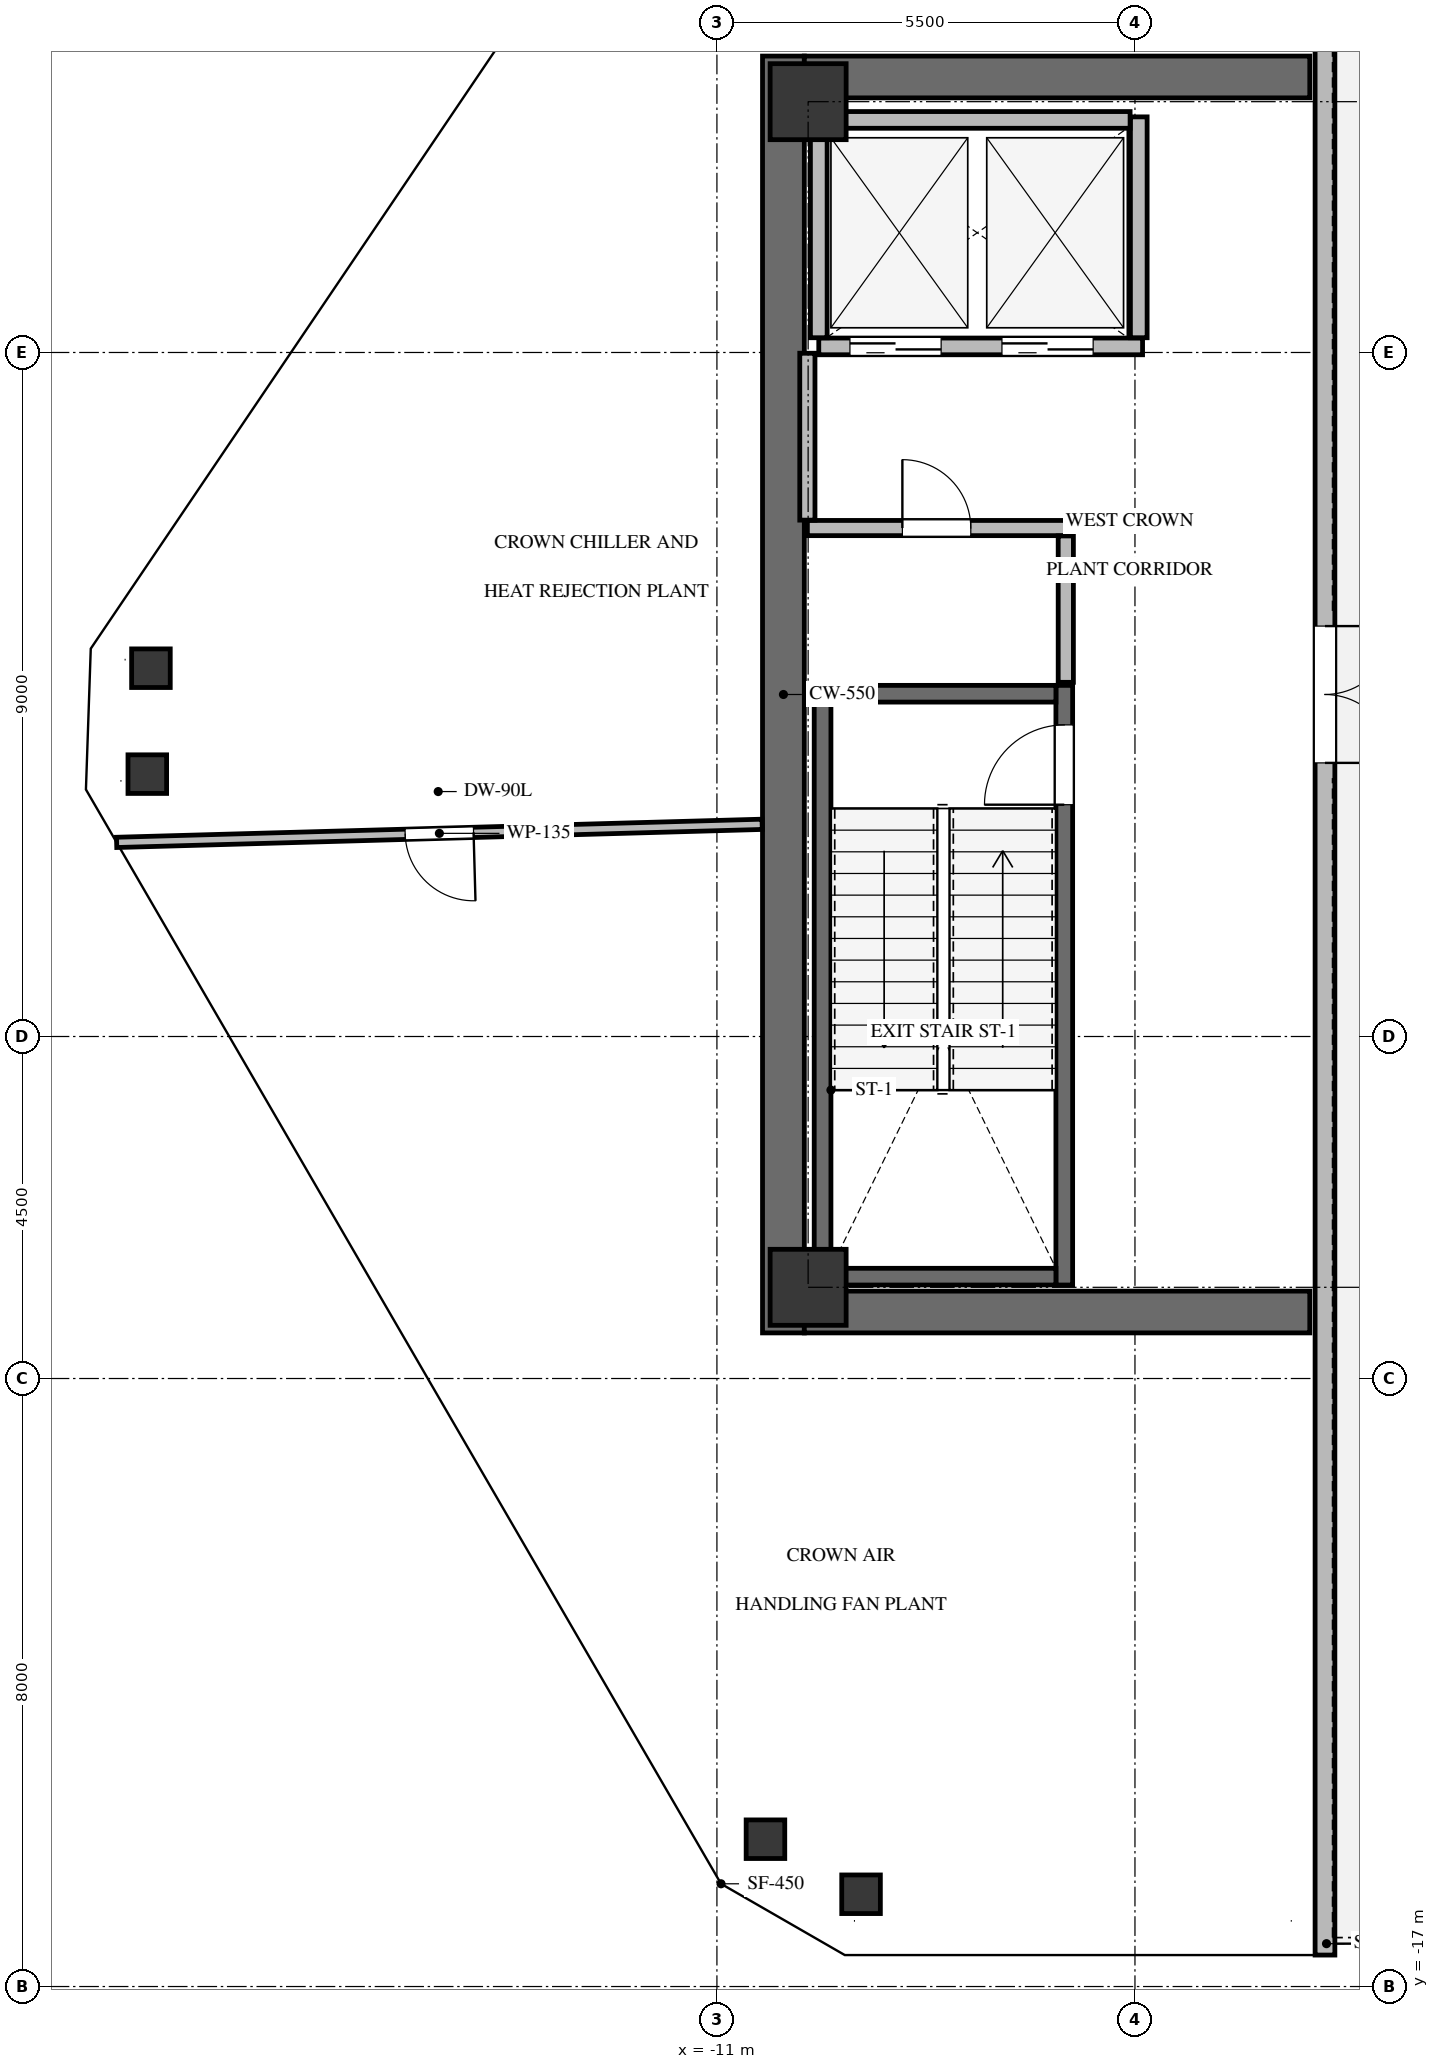
"""IFC4 building model, lengths in metres.
Left out: names, types, materials, properties, quantities, classifications, styles, units other than length and angle.
Written with IfcOpenShell. Run it as: python <this file> out.ifc"""

import sys

from ifc_helpers import new_model, si_unit, direction, frame, frame_2d, origin, origin_2d, place, context, subcontext, project, spatial, rectangle, hollow_circle, extrude, source, transform, mapped, element, fill, save


model = new_model("IFC4")
c1 = context("Model", 3, precision=1e-05, world=origin(), true_north=direction((0.0, 1.0)))
c2 = subcontext(c1, "Body", "Model", "MODEL_VIEW")
j1 = project(units=[si_unit("LENGTHUNIT", "METRE"), si_unit("PLANEANGLEUNIT", "RADIAN")], contexts=[c1])
p1 = place(None, origin())
s1 = spatial("IfcSite", under=j1, at=p1, CompositionType="ELEMENT")
p2 = place(p1, origin())
s2 = spatial("IfcBuilding", under=s1, at=p2, CompositionType="ELEMENT")
p3 = place(p2, frame((0.0, 0.0, 272.5)))
s3 = spatial("IfcBuildingStorey", under=s2, at=p3, CompositionType="ELEMENT", Elevation=272.5)
p4 = place(p3, frame((-10.125, -8.4, 0.0), z_axis=(0.0, 0.0, 1.0), x_axis=(0.0, 1.0, 0.0)))
e1 = element("IfcWall", 1, at=p4, inside=s3, PredefinedType="SHEAR", context=c2, shape_type="SweptSolid", body=[
    extrude(rectangle(XDim=16.8, YDim=0.55, at=frame_2d((8.4, 0.0))), origin(), (0.0, 0.0, 1.0), 4.8),
])
for number, where, z_axis, x_axis in (
    (2, (-9.85, -8.125, 0.0), (0.0, 0.0, 1.0), (1.0, 0.0, 0.0)),
    (3, (-9.85, 8.125, 0.0), (0.0, 0.0, 1.0), (1.0, 0.0, 0.0)),
):
    element("IfcWall", number, at=place(p3, frame(where, z_axis=z_axis, x_axis=x_axis)), inside=s3, PredefinedType="SHEAR", context=c2, shape_type="SweptSolid", body=[
        extrude(rectangle(XDim=6.65, YDim=0.55, at=frame_2d((3.325, 0.0))), origin(), (0.0, 0.0, 1.0), 4.8),
    ])
p5 = place(p3, frame((-6.43, -7.77, -0.45), z_axis=(0.0, 0.0, 1.0), x_axis=(0.0, 1.0, 0.0)))
e4 = element("IfcWall", 4, at=p5, inside=s3, PredefinedType="SHEAR", context=c2, shape_type="SweptSolid", body=[
    extrude(rectangle(XDim=7.89, YDim=0.22, at=frame_2d((3.945, 0.0))), origin(), (0.0, 0.0, 1.0), 4.97),
])
p6 = place(p5, frame((6.32, 0.0, 0.0)))
e5 = element("IfcOpeningElement", 5, at=p6, cuts=e4, PredefinedType="OPENING", context=c2, shape_type="SweptSolid", body=[
    extrude(rectangle(XDim=1.05, YDim=2.15, at=frame_2d((0.525, 1.075))), frame((0.0, 0.12, 0.0), z_axis=(0.0, -1.0, 0.0), x_axis=(1.0, 0.0, 0.0)), (0.0, 0.0, 1.0), 0.24),
])
p7 = place(p3, frame((-9.61, 0.12, -0.45), z_axis=(0.0, 0.0, 1.0), x_axis=(0.0, -1.0, 0.0)))
e6 = element("IfcWall", 6, at=p7, inside=s3, PredefinedType="SHEAR", context=c2, shape_type="SweptSolid", body=[
    extrude(rectangle(XDim=7.89, YDim=0.22, at=frame_2d((3.945, 0.0))), origin(), (0.0, 0.0, 1.0), 4.97),
])
for number, where, z_axis, x_axis in (
    (7, (-9.5, -7.66, -0.45), (0.0, 0.0, 1.0), (1.0, 0.0, 0.0)),
    (8, (-6.54, 0.01, -0.45), (0.0, 0.0, 1.0), (-1.0, 0.0, 0.0)),
):
    element("IfcWall", number, at=place(p3, frame(where, z_axis=z_axis, x_axis=x_axis)), inside=s3, PredefinedType="SHEAR", context=c2, shape_type="SweptSolid", body=[
        extrude(rectangle(XDim=2.96, YDim=0.22, at=frame_2d((1.48, 0.0))), origin(), (0.0, 0.0, 1.0), 4.97),
    ])
m1 = source(origin(), c2, "Body", "SweptSolid", [
    extrude(rectangle(XDim=1.0, YDim=1.0, at=origin_2d()), origin(), (0.0, 0.0, 1.0), 4.97),
])
for number, where, z_axis, x_axis in (
    (9, (-9.8, -7.8, -0.45), (0.0, 0.0, 1.0), (1.0, 0.0, 0.0)),
    (10, (-9.8, 7.8, -0.45), (0.0, 0.0, 1.0), (1.0, 0.0, 0.0)),
):
    element("IfcColumn", number, at=place(p3, frame(where, z_axis=z_axis, x_axis=x_axis)), inside=s3, PredefinedType="COLUMN", context=c2, shape_type="MappedRepresentation", body=[
        mapped(m1, transform((0.0, 0.0, 0.0), x_axis=(1.0, 0.0, 0.0), y_axis=(0.0, 1.0, 0.0), z_axis=(0.0, 0.0, 1.0), scale=1.0)),
    ])
m2 = source(origin(), c2, "Body", "SweptSolid", [
    extrude(hollow_circle(Radius=0.254, WallThickness=0.012, at=origin_2d()), origin(), (0.0, 0.0, 1.0), 4.97),
])
for number, where, z_axis, x_axis in (
    (11, (-10.361, -15.062, -0.45), (0.0, 0.0, 1.0), (1.0, 0.0, 0.0)),
    (12, (-18.494, -1.048, -0.45), (0.0, 0.0, 1.0), (1.0, 0.0, 0.0)),
    (13, (-18.446, 0.346, -0.45), (0.0, 0.0, 1.0), (1.0, 0.0, 0.0)),
    (14, (-9.104, -15.786, -0.45), (0.0, 0.0, 1.0), (1.0, 0.0, 0.0)),
):
    element("IfcColumn", number, at=place(p3, frame(where, z_axis=z_axis, x_axis=x_axis)), inside=s3, PredefinedType="COLUMN", context=c2, shape_type="MappedRepresentation", body=[
        mapped(m2, transform((0.0, 0.0, 0.0), x_axis=(1.0, 0.0, 0.0), y_axis=(0.0, 1.0, 0.0), z_axis=(0.0, 0.0, 1.0), scale=1.0)),
    ])
p8 = place(p3, frame((-3.0, 15.062, 0.0), z_axis=(0.0, 0.0, 1.0), x_axis=(0.0, -1.0, 0.0)))
e15 = element("IfcWall", 15, at=p8, inside=s3, PredefinedType="SOLIDWALL", context=c2, shape_type="SweptSolid", body=[
    extrude(rectangle(XDim=31.648, YDim=0.26, at=frame_2d((15.824, 0.0))), origin(), (0.0, 0.0, 1.0), 4.52),
])
p9 = place(p8, frame((14.162, 0.0, 0.0)))
e16 = element("IfcOpeningElement", 16, at=p9, cuts=e15, PredefinedType="OPENING", context=c2, shape_type="SweptSolid", body=[
    extrude(rectangle(XDim=1.8, YDim=2.3, at=frame_2d((0.9, 1.15))), frame((0.0, 0.14, 0.0), z_axis=(0.0, -1.0, 0.0), x_axis=(1.0, 0.0, 0.0)), (0.0, 0.0, 1.0), 0.28),
])
p10 = place(p3, frame((-9.66, 4.58, 0.0), z_axis=(0.0, 0.0, 1.0), x_axis=(1.0, 0.0, 0.0)))
e17 = element("IfcWall", 17, at=p10, inside=s3, PredefinedType="SOLIDWALL", context=c2, shape_type="SweptSolid", body=[
    extrude(rectangle(XDim=4.26, YDim=0.22, at=frame_2d((2.13, 0.0))), origin(), (0.0, 0.0, 1.0), 4.505),
])
p11 = place(p10, frame((0.41, 0.0, 0.0)))
e18 = element("IfcOpeningElement", 18, at=p11, cuts=e17, PredefinedType="OPENING", context=c2, shape_type="SweptSolid", body=[
    extrude(rectangle(XDim=1.2, YDim=2.15, at=frame_2d((0.6, 1.075))), frame((0.0, 0.12, 0.0), z_axis=(0.0, -1.0, 0.0), x_axis=(1.0, 0.0, 0.0)), (0.0, 0.0, 1.0), 0.24),
])
p12 = place(p10, frame((2.41, 0.0, 0.0)))
e19 = element("IfcOpeningElement", 19, at=p12, cuts=e17, PredefinedType="OPENING", context=c2, shape_type="SweptSolid", body=[
    extrude(rectangle(XDim=1.2, YDim=2.15, at=frame_2d((0.6, 1.075))), frame((0.0, 0.12, 0.0), z_axis=(0.0, -1.0, 0.0), x_axis=(1.0, 0.0, 0.0)), (0.0, 0.0, 1.0), 0.24),
])
p13 = place(p3, frame((-5.45, 4.694, 0.0), z_axis=(0.0, 0.0, 1.0), x_axis=(0.0, 1.0, 0.0)))
e20 = element("IfcWall", 20, at=p13, inside=s3, PredefinedType="SOLIDWALL", context=c2, shape_type="SweptSolid", body=[
    extrude(rectangle(XDim=2.906, YDim=0.22, at=frame_2d((1.453, 0.0))), origin(), (0.0, 0.0, 1.0), 4.505),
])
p14 = place(p3, frame((-9.66, 7.56, 0.0), z_axis=(0.0, 0.0, 1.0), x_axis=(1.0, 0.0, 0.0)))
e21 = element("IfcWall", 21, at=p14, inside=s3, PredefinedType="SOLIDWALL", context=c2, shape_type="SweptSolid", body=[
    extrude(rectangle(XDim=4.096, YDim=0.22, at=frame_2d((2.048, 0.0))), origin(), (0.0, 0.0, 1.0), 4.505),
])
p15 = place(p3, frame((-9.66, 4.694, 0.0), z_axis=(0.0, 0.0, 1.0), x_axis=(0.0, 1.0, 0.0)))
e22 = element("IfcWall", 22, at=p15, inside=s3, PredefinedType="SOLIDWALL", context=c2, shape_type="SweptSolid", body=[
    extrude(rectangle(XDim=2.752, YDim=0.22, at=frame_2d((1.376, 0.0))), origin(), (0.0, 0.0, 1.0), 4.505),
])
p16 = place(p3, frame((-9.81, 2.19, 0.0), z_axis=(0.0, 0.0, 1.0), x_axis=(1.0, 0.0, 0.0)))
e23 = element("IfcWall", 23, at=p16, inside=s3, PredefinedType="SOLIDWALL", context=c2, shape_type="SweptSolid", body=[
    extrude(rectangle(XDim=3.4, YDim=0.2, at=frame_2d((1.7, 0.0))), origin(), (0.0, 0.0, 1.0), 4.505),
])
p17 = place(p16, frame((1.25, 0.0, 0.0)))
e24 = element("IfcOpeningElement", 24, at=p17, cuts=e23, PredefinedType="OPENING", context=c2, shape_type="SweptSolid", body=[
    extrude(rectangle(XDim=0.9, YDim=2.05, at=frame_2d((0.45, 1.025))), frame((0.0, 0.11, 0.0), z_axis=(0.0, -1.0, 0.0), x_axis=(1.0, 0.0, 0.0)), (0.0, 0.0, 1.0), 0.22),
])
p18 = place(p3, frame((-9.81, 4.49, 0.0), z_axis=(0.0, 0.0, 1.0), x_axis=(0.0, -1.0, 0.0)))
e25 = element("IfcWall", 25, at=p18, inside=s3, PredefinedType="SOLIDWALL", context=c2, shape_type="SweptSolid", body=[
    extrude(rectangle(XDim=2.196, YDim=0.2, at=frame_2d((1.098, 0.0))), origin(), (0.0, 0.0, 1.0), 4.505),
])
p19 = place(p3, frame((-6.41, 2.086, 0.0), z_axis=(0.0, 0.0, 1.0), x_axis=(0.0, -1.0, 0.0)))
e26 = element("IfcWall", 26, at=p19, inside=s3, PredefinedType="SOLIDWALL", context=c2, shape_type="SweptSolid", body=[
    extrude(rectangle(XDim=1.926, YDim=0.2, at=frame_2d((0.963, 0.0))), origin(), (0.0, 0.0, 1.0), 4.505),
])
p20 = place(p3, frame((-10.405, -1.708, 0.0), z_axis=(0.0, 0.0, 1.0), x_axis=(-0.999607454952, -0.028016709362, 0.0)))
e27 = element("IfcWall", 27, at=p20, inside=s3, PredefinedType="PARTITIONING", context=c2, shape_type="SweptSolid", body=[
    extrude(rectangle(XDim=8.496, YDim=0.135, at=frame_2d((4.248, 0.0))), origin(), (0.0, 0.0, 1.0), 3.859),
])
p21 = place(p20, frame((3.798, 0.0, 0.0)))
e28 = element("IfcOpeningElement", 28, at=p21, cuts=e27, PredefinedType="OPENING", context=c2, shape_type="SweptSolid", body=[
    extrude(rectangle(XDim=0.9, YDim=2.05, at=frame_2d((0.45, 1.025))), frame((0.0, 0.078, 0.0), z_axis=(0.0, -1.0, 0.0), x_axis=(1.0, 0.0, 0.0)), (0.0, 0.0, 1.0), 0.155),
])
m3 = source(origin(), c2, "Body", "SweptSolid", [
    extrude(rectangle(XDim=1.8, YDim=2.3, at=frame_2d((0.9, 1.15))), frame((0.0, 0.025, 0.0), z_axis=(0.0, -1.0, 0.0), x_axis=(1.0, 0.0, 0.0)), (0.0, 0.0, 1.0), 0.05),
])
p22 = place(p9, origin())
e29 = element("IfcDoor", 29, at=p22, inside=s3, OperationType="DOUBLE_DOOR_SINGLE_SWING", PredefinedType="DOOR", context=c2, shape_type="MappedRepresentation", body=[
    mapped(m3, transform((0.0, 0.0, 0.0), x_axis=(1.0, 0.0, 0.0), y_axis=(0.0, 1.0, 0.0), z_axis=(0.0, 0.0, 1.0), scale=1.0)),
])
fill(e16, e29)
m4 = source(origin(), c2, "Body", "SweptSolid", [
    extrude(rectangle(XDim=1.05, YDim=2.15, at=frame_2d((0.525, 1.075))), frame((0.0, 0.025, 0.0), z_axis=(0.0, -1.0, 0.0), x_axis=(1.0, 0.0, 0.0)), (0.0, 0.0, 1.0), 0.05),
])
p23 = place(p6, origin())
e30 = element("IfcDoor", 30, at=p23, inside=s3, OperationType="SINGLE_SWING_LEFT", PredefinedType="DOOR", context=c2, shape_type="MappedRepresentation", body=[
    mapped(m4, transform((0.0, 0.0, 0.0), x_axis=(1.0, 0.0, 0.0), y_axis=(0.0, 1.0, 0.0), z_axis=(0.0, 0.0, 1.0), scale=1.0)),
])
fill(e5, e30)
m5 = source(origin(), c2, "Body", "SweptSolid", [
    extrude(rectangle(XDim=1.2, YDim=2.15, at=frame_2d((0.6, 1.075))), frame((0.0, 0.025, 0.0), z_axis=(0.0, -1.0, 0.0), x_axis=(1.0, 0.0, 0.0)), (0.0, 0.0, 1.0), 0.05),
])
p24 = place(p11, origin())
e31 = element("IfcDoor", 31, at=p24, inside=s3, OperationType="DOUBLE_DOOR_SLIDING", PredefinedType="DOOR", context=c2, shape_type="MappedRepresentation", body=[
    mapped(m5, transform((0.0, 0.0, 0.0), x_axis=(1.0, 0.0, 0.0), y_axis=(0.0, 1.0, 0.0), z_axis=(0.0, 0.0, 1.0), scale=1.0)),
])
fill(e18, e31)
p25 = place(p12, origin())
e32 = element("IfcDoor", 32, at=p25, inside=s3, OperationType="DOUBLE_DOOR_SLIDING", PredefinedType="DOOR", context=c2, shape_type="MappedRepresentation", body=[
    mapped(m5, transform((0.0, 0.0, 0.0), x_axis=(1.0, 0.0, 0.0), y_axis=(0.0, 1.0, 0.0), z_axis=(0.0, 0.0, 1.0), scale=1.0)),
])
fill(e19, e32)
m6 = source(origin(), c2, "Body", "SweptSolid", [
    extrude(rectangle(XDim=0.9, YDim=2.05, at=frame_2d((0.45, 1.025))), frame((0.0, 0.025, 0.0), z_axis=(0.0, -1.0, 0.0), x_axis=(1.0, 0.0, 0.0)), (0.0, 0.0, 1.0), 0.05),
])
p26 = place(p17, origin())
e33 = element("IfcDoor", 33, at=p26, inside=s3, OperationType="SINGLE_SWING_LEFT", PredefinedType="DOOR", context=c2, shape_type="MappedRepresentation", body=[
    mapped(m6, transform((0.0, 0.0, 0.0), x_axis=(1.0, 0.0, 0.0), y_axis=(0.0, 1.0, 0.0), z_axis=(0.0, 0.0, 1.0), scale=1.0)),
])
fill(e24, e33)
m7 = source(origin(), c2, "Body", "SweptSolid", [
    extrude(rectangle(XDim=0.9, YDim=2.05, at=frame_2d((0.45, 1.025))), frame((0.0, 0.025, 0.0), z_axis=(0.0, -1.0, 0.0), x_axis=(1.0, 0.0, 0.0)), (0.0, 0.0, 1.0), 0.05),
])
p27 = place(p21, origin())
e34 = element("IfcDoor", 34, at=p27, inside=s3, OperationType="SINGLE_SWING_LEFT", PredefinedType="DOOR", context=c2, shape_type="MappedRepresentation", body=[
    mapped(m7, transform((0.0, 0.0, 0.0), x_axis=(1.0, 0.0, 0.0), y_axis=(0.0, 1.0, 0.0), z_axis=(0.0, 0.0, 1.0), scale=1.0)),
])
fill(e28, e34)
save(model, sys.argv[1])
